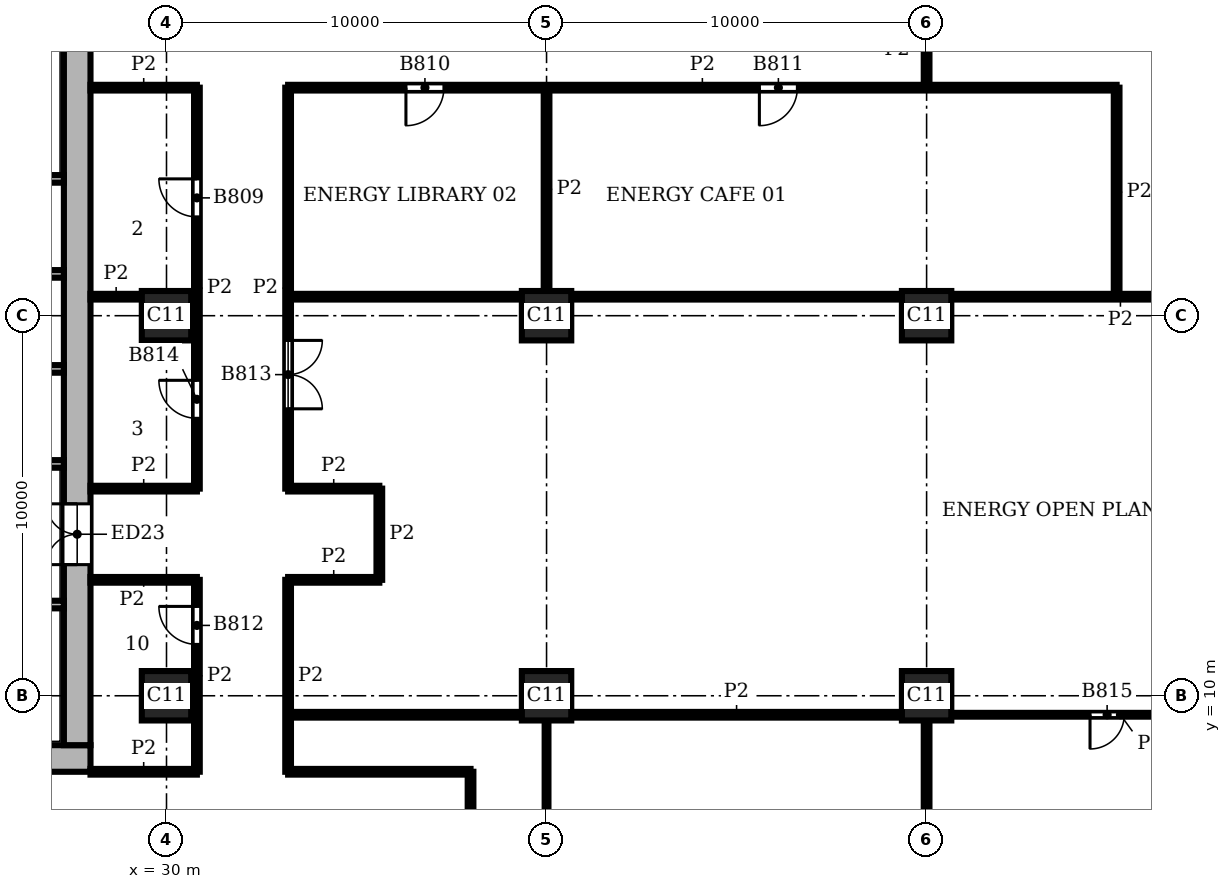
"""IFC4 building model, lengths in metres.
Left out: names, types, materials, properties, quantities, classifications, styles, units other than length and angle.
Written with IfcOpenShell. Run it as: python <this file> out.ifc"""

import sys

from ifc_helpers import new_model, si_unit, direction, frame, frame_2d, origin, origin_2d, place, context, subcontext, project, spatial, rectangle, extrude, element, fill, save


model = new_model("IFC4")
c1 = context("Model", 3, precision=1e-05, world=origin(), true_north=direction((0.0, 1.0)))
c2 = subcontext(c1, "Body", "Model", "MODEL_VIEW")
j1 = project(units=[si_unit("LENGTHUNIT", "METRE"), si_unit("PLANEANGLEUNIT", "RADIAN")], contexts=[c1])
p1 = place(None, origin())
s1 = spatial("IfcSite", under=j1, at=p1, CompositionType="ELEMENT")
p2 = place(p1, origin())
s2 = spatial("IfcBuilding", under=s1, at=p2, CompositionType="ELEMENT")
p3 = place(p2, frame((0.0, 0.0, 213.6)))
s3 = spatial("IfcBuildingStorey", under=s2, at=p3, CompositionType="ELEMENT", Elevation=213.6)
for number, where, z_axis, x_axis in (
    (1, (30.0, 10.0, 0.0), (0.0, 0.0, 1.0), (1.0, 0.0, 0.0)),
    (2, (30.0, 20.0, 0.0), (0.0, 0.0, 1.0), (1.0, 0.0, 0.0)),
    (3, (40.0, 10.0, 0.0), (0.0, 0.0, 1.0), (1.0, 0.0, 0.0)),
    (4, (40.0, 20.0, 0.0), (0.0, 0.0, 1.0), (1.0, 0.0, 0.0)),
    (5, (50.0, 10.0, 0.0), (0.0, 0.0, 1.0), (1.0, 0.0, 0.0)),
    (6, (50.0, 20.0, 0.0), (0.0, 0.0, 1.0), (1.0, 0.0, 0.0)),
):
    element("IfcColumn", number, at=place(p3, frame(where, z_axis=z_axis, x_axis=x_axis)), inside=s3, PredefinedType="COLUMN", context=c2, shape_type="SweptSolid", body=[
        extrude(rectangle(XDim=1.3, YDim=1.3, at=origin_2d()), origin(), (0.0, 0.0, 1.0), 3.9),
    ])
p4 = place(p3, frame((8.0, 8.35, 0.0), z_axis=(0.0, 0.0, 1.0), x_axis=(1.0, 0.0, 0.0)))
e7 = element("IfcWall", 7, at=p4, inside=s3, PredefinedType="SHEAR", context=c2, shape_type="SweptSolid", body=[
    extrude(rectangle(XDim=20.0, YDim=0.7, at=frame_2d((10.0, 0.0))), origin(), (0.0, 0.0, 1.0), 3.9),
])
p5 = place(p3, frame((27.65, 8.7, 0.0), z_axis=(0.0, 0.0, 1.0), x_axis=(0.0, 1.0, 0.0)))
e8 = element("IfcWall", 8, at=p5, inside=s3, PredefinedType="SHEAR", context=c2, shape_type="SweptSolid", body=[
    extrude(rectangle(XDim=18.6, YDim=0.7, at=frame_2d((9.3, 0.0))), origin(), (0.0, 0.0, 1.0), 3.9),
])
p6 = place(p5, frame((4.75, 0.0, 0.0)))
e9 = element("IfcOpeningElement", 9, at=p6, cuts=e8, PredefinedType="OPENING", context=c2, shape_type="SweptSolid", body=[
    extrude(rectangle(XDim=1.6, YDim=2.1, at=frame_2d((0.8, 1.05))), frame((0.0, 0.36, 0.0), z_axis=(0.0, -1.0, 0.0), x_axis=(1.0, 0.0, 0.0)), (0.0, 0.0, 1.0), 0.72),
])
p7 = place(p3, frame((13.8, 12.4, 0.0), z_axis=(0.0, 0.0, 1.0), x_axis=(1.0, 0.0, 0.0)))
e10 = element("IfcWall", 10, at=p7, inside=s3, PredefinedType="SHEAR", context=c2, shape_type="SweptSolid", body=[
    extrude(rectangle(XDim=13.5, YDim=0.2, at=frame_2d((6.75, 0.0))), origin(), (0.0, 0.0, 1.0), 3.58),
])
p8 = place(p7, frame((2.4, 0.0, 0.0)))
e11 = element("IfcOpeningElement", 11, at=p8, cuts=e10, PredefinedType="OPENING", context=c2, shape_type="SweptSolid", body=[
    extrude(rectangle(XDim=1.1, YDim=2.1, at=frame_2d((0.55, 1.05))), frame((0.0, 0.11, 0.0), z_axis=(0.0, -1.0, 0.0), x_axis=(1.0, 0.0, 0.0)), (0.0, 0.0, 1.0), 0.22),
])
p9 = place(p7, frame((4.9, 0.0, 0.0)))
e12 = element("IfcOpeningElement", 12, at=p9, cuts=e10, PredefinedType="OPENING", context=c2, shape_type="SweptSolid", body=[
    extrude(rectangle(XDim=1.1, YDim=2.1, at=frame_2d((0.55, 1.05))), frame((0.0, 0.11, 0.0), z_axis=(0.0, -1.0, 0.0), x_axis=(1.0, 0.0, 0.0)), (0.0, 0.0, 1.0), 0.22),
])
p10 = place(p7, frame((0.2, 0.0, 0.0)))
e13 = element("IfcOpeningElement", 13, at=p10, cuts=e10, PredefinedType="OPENING", context=c2, shape_type="SweptSolid", body=[
    extrude(rectangle(XDim=1.0, YDim=2.1, at=frame_2d((0.5, 1.05))), frame((0.0, 0.11, 0.0), z_axis=(0.0, -1.0, 0.0), x_axis=(1.0, 0.0, 0.0)), (0.0, 0.0, 1.0), 0.22),
])
for number, where, z_axis, x_axis in (
    (14, (24.3, 16.1, 0.0), (0.0, 0.0, 1.0), (1.0, 0.0, 0.0)),
    (15, (24.3, 18.6, 0.0), (0.0, 0.0, 1.0), (1.0, 0.0, 0.0)),
    (16, (24.3, 21.1, 0.0), (0.0, 0.0, 1.0), (1.0, 0.0, 0.0)),
):
    element("IfcWall", number, at=place(p3, frame(where, z_axis=z_axis, x_axis=x_axis)), inside=s3, PredefinedType="SHEAR", context=c2, shape_type="SweptSolid", body=[
        extrude(rectangle(XDim=3.0, YDim=0.2, at=frame_2d((1.5, 0.0))), origin(), (0.0, 0.0, 1.0), 3.58),
    ])
p11 = place(p3, frame((13.8, 23.6, 0.0), z_axis=(0.0, 0.0, 1.0), x_axis=(1.0, 0.0, 0.0)))
e17 = element("IfcWall", 17, at=p11, inside=s3, PredefinedType="SHEAR", context=c2, shape_type="SweptSolid", body=[
    extrude(rectangle(XDim=13.5, YDim=0.2, at=frame_2d((6.75, 0.0))), origin(), (0.0, 0.0, 1.0), 3.58),
])
p12 = place(p11, frame((2.4, 0.0, 0.0)))
e18 = element("IfcOpeningElement", 18, at=p12, cuts=e17, PredefinedType="OPENING", context=c2, shape_type="SweptSolid", body=[
    extrude(rectangle(XDim=1.1, YDim=2.1, at=frame_2d((0.55, 1.05))), frame((0.0, 0.11, 0.0), z_axis=(0.0, -1.0, 0.0), x_axis=(1.0, 0.0, 0.0)), (0.0, 0.0, 1.0), 0.22),
])
p13 = place(p11, frame((4.9, 0.0, 0.0)))
e19 = element("IfcOpeningElement", 19, at=p13, cuts=e17, PredefinedType="OPENING", context=c2, shape_type="SweptSolid", body=[
    extrude(rectangle(XDim=1.1, YDim=2.1, at=frame_2d((0.55, 1.05))), frame((0.0, 0.11, 0.0), z_axis=(0.0, -1.0, 0.0), x_axis=(1.0, 0.0, 0.0)), (0.0, 0.0, 1.0), 0.22),
])
p14 = place(p11, frame((0.2, 0.0, 0.0)))
e20 = element("IfcOpeningElement", 20, at=p14, cuts=e17, PredefinedType="OPENING", context=c2, shape_type="SweptSolid", body=[
    extrude(rectangle(XDim=1.0, YDim=2.1, at=frame_2d((0.5, 1.05))), frame((0.0, 0.11, 0.0), z_axis=(0.0, -1.0, 0.0), x_axis=(1.0, 0.0, 0.0)), (0.0, 0.0, 1.0), 0.22),
])
p15 = place(p3, frame((40.0, 0.45, 0.0), z_axis=(0.0, 0.0, 1.0), x_axis=(0.0, 1.0, 0.0)))
e21 = element("IfcWall", 21, at=p15, inside=s3, PredefinedType="PARTITIONING", context=c2, shape_type="SweptSolid", body=[
    extrude(rectangle(XDim=8.9, YDim=0.1, at=frame_2d((4.45, 0.0))), origin(), (0.0, 0.0, 1.0), 3.58),
])
p16 = place(p15, frame((3.975, 0.0, 0.0)))
e22 = element("IfcOpeningElement", 22, at=p16, cuts=e21, PredefinedType="OPENING", context=c2, shape_type="SweptSolid", body=[
    extrude(rectangle(XDim=0.95, YDim=2.1, at=frame_2d((0.475, 1.05))), frame((0.0, 0.06, 0.0), z_axis=(0.0, -1.0, 0.0), x_axis=(1.0, 0.0, 0.0)), (0.0, 0.0, 1.0), 0.12),
])
p17 = place(p3, frame((50.65, 9.5, 0.0), z_axis=(0.0, 0.0, 1.0), x_axis=(1.0, 0.0, 0.0)))
e23 = element("IfcWall", 23, at=p17, inside=s3, PredefinedType="PARTITIONING", context=c2, shape_type="SweptSolid", body=[
    extrude(rectangle(XDim=8.9, YDim=0.1, at=frame_2d((4.45, 0.0))), origin(), (0.0, 0.0, 1.0), 3.58),
])
p18 = place(p17, frame((3.65, 0.0, 0.0)))
e24 = element("IfcOpeningElement", 24, at=p18, cuts=e23, PredefinedType="OPENING", context=c2, shape_type="SweptSolid", body=[
    extrude(rectangle(XDim=0.9, YDim=2.1, at=frame_2d((0.45, 1.05))), frame((0.0, 0.06, 0.0), z_axis=(0.0, -1.0, 0.0), x_axis=(1.0, 0.0, 0.0)), (0.0, 0.0, 1.0), 0.12),
])
p19 = place(p3, frame((30.8, 8.001, 0.0), z_axis=(0.0, 0.0, 1.0), x_axis=(0.0, 1.0, 0.0)))
e25 = element("IfcWall", 25, at=p19, inside=s3, PredefinedType="PARTITIONING", context=c2, shape_type="SweptSolid", body=[
    extrude(rectangle(XDim=5.048, YDim=0.15, at=frame_2d((2.524, 0.0))), origin(), (0.0, 0.0, 1.0), 3.58),
])
p20 = place(p19, frame((3.35, 0.0, 0.0)))
e26 = element("IfcOpeningElement", 26, at=p20, cuts=e25, PredefinedType="OPENING", context=c2, shape_type="SweptSolid", body=[
    extrude(rectangle(XDim=1.0, YDim=2.1, at=frame_2d((0.5, 1.05))), frame((0.0, 0.085, 0.0), z_axis=(0.0, -1.0, 0.0), x_axis=(1.0, 0.0, 0.0)), (0.0, 0.0, 1.0), 0.17),
])
p21 = place(p3, frame((30.8, 15.45, 0.0), z_axis=(0.0, 0.0, 1.0), x_axis=(0.0, 1.0, 0.0)))
e27 = element("IfcWall", 27, at=p21, inside=s3, PredefinedType="PARTITIONING", context=c2, shape_type="SweptSolid", body=[
    extrude(rectangle(XDim=10.55, YDim=0.15, at=frame_2d((5.275, 0.0))), origin(), (0.0, 0.0, 1.0), 3.58),
])
p22 = place(p21, frame((7.15, 0.0, 0.0)))
e28 = element("IfcOpeningElement", 28, at=p22, cuts=e27, PredefinedType="OPENING", context=c2, shape_type="SweptSolid", body=[
    extrude(rectangle(XDim=1.0, YDim=2.1, at=frame_2d((0.5, 1.05))), frame((0.0, 0.085, 0.0), z_axis=(0.0, -1.0, 0.0), x_axis=(1.0, 0.0, 0.0)), (0.0, 0.0, 1.0), 0.17),
])
p23 = place(p21, frame((1.85, 0.0, 0.0)))
e29 = element("IfcOpeningElement", 29, at=p23, cuts=e27, PredefinedType="OPENING", context=c2, shape_type="SweptSolid", body=[
    extrude(rectangle(XDim=1.0, YDim=2.1, at=frame_2d((0.5, 1.05))), frame((0.0, 0.085, 0.0), z_axis=(0.0, -1.0, 0.0), x_axis=(1.0, 0.0, 0.0)), (0.0, 0.0, 1.0), 0.17),
])
p24 = place(p3, frame((33.2, 8.0, 0.0), z_axis=(0.0, 0.0, 1.0), x_axis=(0.0, 1.0, 0.0)))
e30 = element("IfcWall", 30, at=p24, inside=s3, PredefinedType="PARTITIONING", context=c2, shape_type="SweptSolid", body=[
    extrude(rectangle(XDim=5.05, YDim=0.15, at=frame_2d((2.525, 0.0))), origin(), (0.0, 0.0, 1.0), 3.58),
])
p25 = place(p3, frame((33.2, 15.45, 0.0), z_axis=(0.0, 0.0, 1.0), x_axis=(0.0, 1.0, 0.0)))
e31 = element("IfcWall", 31, at=p25, inside=s3, PredefinedType="PARTITIONING", context=c2, shape_type="SweptSolid", body=[
    extrude(rectangle(XDim=10.55, YDim=0.15, at=frame_2d((5.275, 0.0))), origin(), (0.0, 0.0, 1.0), 3.58),
])
p26 = place(p25, frame((2.1, 0.0, 0.0)))
e32 = element("IfcOpeningElement", 32, at=p26, cuts=e31, PredefinedType="OPENING", context=c2, shape_type="SweptSolid", body=[
    extrude(rectangle(XDim=1.8, YDim=2.1, at=frame_2d((0.9, 1.05))), frame((0.0, 0.085, 0.0), z_axis=(0.0, -1.0, 0.0), x_axis=(1.0, 0.0, 0.0)), (0.0, 0.0, 1.0), 0.17),
])
p27 = place(p3, frame((35.6, 13.05, 0.0), z_axis=(0.0, 0.0, 1.0), x_axis=(0.0, 1.0, 0.0)))
e33 = element("IfcWall", 33, at=p27, inside=s3, PredefinedType="PARTITIONING", context=c2, shape_type="SweptSolid", body=[
    extrude(rectangle(XDim=2.4, YDim=0.15, at=frame_2d((1.2, 0.0))), origin(), (0.0, 0.0, 1.0), 3.58),
])
p28 = place(p3, frame((38.0, 4.5, 0.0), z_axis=(0.0, 0.0, 1.0), x_axis=(0.0, 1.0, 0.0)))
e34 = element("IfcWall", 34, at=p28, inside=s3, PredefinedType="PARTITIONING", context=c2, shape_type="SweptSolid", body=[
    extrude(rectangle(XDim=3.5, YDim=0.15, at=frame_2d((1.75, 0.0))), origin(), (0.0, 0.0, 1.0), 3.58),
])
p29 = place(p3, frame((40.0, 20.65, 0.0), z_axis=(0.0, 0.0, 1.0), x_axis=(0.0, 1.0, 0.0)))
e35 = element("IfcWall", 35, at=p29, inside=s3, PredefinedType="PARTITIONING", context=c2, shape_type="SweptSolid", body=[
    extrude(rectangle(XDim=5.35, YDim=0.15, at=frame_2d((2.675, 0.0))), origin(), (0.0, 0.0, 1.0), 3.58),
])
p30 = place(p3, frame((50.0, 0.45, 0.0), z_axis=(0.0, 0.0, 1.0), x_axis=(0.0, 1.0, 0.0)))
e36 = element("IfcWall", 36, at=p30, inside=s3, PredefinedType="PARTITIONING", context=c2, shape_type="SweptSolid", body=[
    extrude(rectangle(XDim=8.9, YDim=0.15, at=frame_2d((4.45, 0.0))), origin(), (0.0, 0.0, 1.0), 3.58),
])
p31 = place(p3, frame((50.0, 26.0, 0.0), z_axis=(0.0, 0.0, 1.0), x_axis=(0.0, 1.0, 0.0)))
e37 = element("IfcWall", 37, at=p31, inside=s3, PredefinedType="PARTITIONING", context=c2, shape_type="SweptSolid", body=[
    extrude(rectangle(XDim=3.55, YDim=0.15, at=frame_2d((1.775, 0.0))), origin(), (0.0, 0.0, 1.0), 3.58),
])
p32 = place(p31, frame((1.35, 0.0, 0.0)))
e38 = element("IfcOpeningElement", 38, at=p32, cuts=e37, PredefinedType="OPENING", context=c2, shape_type="SweptSolid", body=[
    extrude(rectangle(XDim=1.0, YDim=2.1, at=frame_2d((0.5, 1.05))), frame((0.0, 0.085, 0.0), z_axis=(0.0, -1.0, 0.0), x_axis=(1.0, 0.0, 0.0)), (0.0, 0.0, 1.0), 0.17),
])
p33 = place(p3, frame((55.0, 20.5, 0.0), z_axis=(0.0, 0.0, 1.0), x_axis=(0.0, 1.0, 0.0)))
e39 = element("IfcWall", 39, at=p33, inside=s3, PredefinedType="PARTITIONING", context=c2, shape_type="SweptSolid", body=[
    extrude(rectangle(XDim=5.5, YDim=0.15, at=frame_2d((2.75, 0.0))), origin(), (0.0, 0.0, 1.0), 3.58),
])
p34 = place(p3, frame((28.0, 8.0, 0.0), z_axis=(0.0, 0.0, 1.0), x_axis=(1.0, 0.0, 0.0)))
e40 = element("IfcWall", 40, at=p34, inside=s3, PredefinedType="PARTITIONING", context=c2, shape_type="SweptSolid", body=[
    extrude(rectangle(XDim=2.799, YDim=0.15, at=frame_2d((1.399, 0.0))), origin(), (0.0, 0.0, 1.0), 3.58),
])
p35 = place(p3, frame((33.2, 8.0, 0.0), z_axis=(0.0, 0.0, 1.0), x_axis=(1.0, 0.0, 0.0)))
e41 = element("IfcWall", 41, at=p35, inside=s3, PredefinedType="PARTITIONING", context=c2, shape_type="SweptSolid", body=[
    extrude(rectangle(XDim=4.8, YDim=0.15, at=frame_2d((2.4, 0.0))), origin(), (0.0, 0.0, 1.0), 3.58),
])
p36 = place(p3, frame((33.2, 9.5, 0.0), z_axis=(0.0, 0.0, 1.0), x_axis=(1.0, 0.0, 0.0)))
e42 = element("IfcWall", 42, at=p36, inside=s3, PredefinedType="PARTITIONING", context=c2, shape_type="SweptSolid", body=[
    extrude(rectangle(XDim=6.15, YDim=0.15, at=frame_2d((3.075, 0.0))), origin(), (0.0, 0.0, 1.0), 3.58),
])
p37 = place(p3, frame((40.65, 9.5, 0.0), z_axis=(0.0, 0.0, 1.0), x_axis=(1.0, 0.0, 0.0)))
e43 = element("IfcWall", 43, at=p37, inside=s3, PredefinedType="PARTITIONING", context=c2, shape_type="SweptSolid", body=[
    extrude(rectangle(XDim=8.7, YDim=0.15, at=frame_2d((4.35, 0.0))), origin(), (0.0, 0.0, 1.0), 3.58),
])
p38 = place(p3, frame((28.0, 13.05, 0.0), z_axis=(0.0, 0.0, 1.0), x_axis=(1.0, 0.0, 0.0)))
e44 = element("IfcWall", 44, at=p38, inside=s3, PredefinedType="PARTITIONING", context=c2, shape_type="SweptSolid", body=[
    extrude(rectangle(XDim=2.799, YDim=0.15, at=frame_2d((1.399, 0.0))), origin(), (0.0, 0.0, 1.0), 3.58),
])
p39 = place(p3, frame((33.2, 13.05, 0.0), z_axis=(0.0, 0.0, 1.0), x_axis=(1.0, 0.0, 0.0)))
e45 = element("IfcWall", 45, at=p39, inside=s3, PredefinedType="PARTITIONING", context=c2, shape_type="SweptSolid", body=[
    extrude(rectangle(XDim=2.4, YDim=0.15, at=frame_2d((1.2, 0.0))), origin(), (0.0, 0.0, 1.0), 3.58),
])
p40 = place(p3, frame((28.0, 15.45, 0.0), z_axis=(0.0, 0.0, 1.0), x_axis=(1.0, 0.0, 0.0)))
e46 = element("IfcWall", 46, at=p40, inside=s3, PredefinedType="PARTITIONING", context=c2, shape_type="SweptSolid", body=[
    extrude(rectangle(XDim=2.8, YDim=0.15, at=frame_2d((1.4, 0.0))), origin(), (0.0, 0.0, 1.0), 3.58),
])
p41 = place(p3, frame((33.2, 15.45, 0.0), z_axis=(0.0, 0.0, 1.0), x_axis=(1.0, 0.0, 0.0)))
e47 = element("IfcWall", 47, at=p41, inside=s3, PredefinedType="PARTITIONING", context=c2, shape_type="SweptSolid", body=[
    extrude(rectangle(XDim=2.4, YDim=0.15, at=frame_2d((1.2, 0.0))), origin(), (0.0, 0.0, 1.0), 3.58),
])
p42 = place(p3, frame((28.0, 20.5, 0.0), z_axis=(0.0, 0.0, 1.0), x_axis=(1.0, 0.0, 0.0)))
e48 = element("IfcWall", 48, at=p42, inside=s3, PredefinedType="PARTITIONING", context=c2, shape_type="SweptSolid", body=[
    extrude(rectangle(XDim=1.35, YDim=0.15, at=frame_2d((0.675, 0.0))), origin(), (0.0, 0.0, 1.0), 3.58),
])
p43 = place(p3, frame((33.2, 20.5, 0.0), z_axis=(0.0, 0.0, 1.0), x_axis=(1.0, 0.0, 0.0)))
e49 = element("IfcWall", 49, at=p43, inside=s3, PredefinedType="PARTITIONING", context=c2, shape_type="SweptSolid", body=[
    extrude(rectangle(XDim=6.15, YDim=0.15, at=frame_2d((3.075, 0.0))), origin(), (0.0, 0.0, 1.0), 3.58),
])
p44 = place(p3, frame((40.65, 20.5, 0.0), z_axis=(0.0, 0.0, 1.0), x_axis=(1.0, 0.0, 0.0)))
e50 = element("IfcWall", 50, at=p44, inside=s3, PredefinedType="PARTITIONING", context=c2, shape_type="SweptSolid", body=[
    extrude(rectangle(XDim=8.7, YDim=0.15, at=frame_2d((4.35, 0.0))), origin(), (0.0, 0.0, 1.0), 3.58),
])
p45 = place(p3, frame((50.65, 20.5, 0.0), z_axis=(0.0, 0.0, 1.0), x_axis=(1.0, 0.0, 0.0)))
e51 = element("IfcWall", 51, at=p45, inside=s3, PredefinedType="PARTITIONING", context=c2, shape_type="SweptSolid", body=[
    extrude(rectangle(XDim=8.9, YDim=0.15, at=frame_2d((4.45, 0.0))), origin(), (0.0, 0.0, 1.0), 3.58),
])
p46 = place(p3, frame((28.0, 26.0, 0.0), z_axis=(0.0, 0.0, 1.0), x_axis=(1.0, 0.0, 0.0)))
e52 = element("IfcWall", 52, at=p46, inside=s3, PredefinedType="PARTITIONING", context=c2, shape_type="SweptSolid", body=[
    extrude(rectangle(XDim=2.8, YDim=0.15, at=frame_2d((1.4, 0.0))), origin(), (0.0, 0.0, 1.0), 3.58),
])
p47 = place(p3, frame((33.2, 26.0, 0.0), z_axis=(0.0, 0.0, 1.0), x_axis=(1.0, 0.0, 0.0)))
e53 = element("IfcWall", 53, at=p47, inside=s3, PredefinedType="PARTITIONING", context=c2, shape_type="SweptSolid", body=[
    extrude(rectangle(XDim=21.8, YDim=0.15, at=frame_2d((10.9, 0.0))), origin(), (0.0, 0.0, 1.0), 3.58),
])
p48 = place(p47, frame((3.1, 0.0, 0.0)))
e54 = element("IfcOpeningElement", 54, at=p48, cuts=e53, PredefinedType="OPENING", context=c2, shape_type="SweptSolid", body=[
    extrude(rectangle(XDim=1.0, YDim=2.1, at=frame_2d((0.5, 1.05))), frame((0.0, 0.085, 0.0), z_axis=(0.0, -1.0, 0.0), x_axis=(1.0, 0.0, 0.0)), (0.0, 0.0, 1.0), 0.17),
])
p49 = place(p47, frame((12.4, 0.0, 0.0)))
e55 = element("IfcOpeningElement", 55, at=p49, cuts=e53, PredefinedType="OPENING", context=c2, shape_type="SweptSolid", body=[
    extrude(rectangle(XDim=1.0, YDim=2.1, at=frame_2d((0.5, 1.05))), frame((0.0, 0.085, 0.0), z_axis=(0.0, -1.0, 0.0), x_axis=(1.0, 0.0, 0.0)), (0.0, 0.0, 1.0), 0.17),
])
p50 = place(p6, origin())
e56 = element("IfcDoor", 56, at=p50, inside=s3, OperationType="DOUBLE_DOOR_SINGLE_SWING", PredefinedType="DOOR", context=c2, shape_type="SweptSolid", body=[
    extrude(rectangle(XDim=1.6, YDim=2.1, at=frame_2d((0.8, 1.05))), frame((0.0, 0.025, 0.0), z_axis=(0.0, -1.0, 0.0), x_axis=(1.0, 0.0, 0.0)), (0.0, 0.0, 1.0), 0.05),
])
fill(e9, e56)
p51 = place(p22, origin())
e57 = element("IfcDoor", 57, at=p51, inside=s3, OperationType="SINGLE_SWING_RIGHT", PredefinedType="DOOR", context=c2, shape_type="SweptSolid", body=[
    extrude(rectangle(XDim=1.0, YDim=2.1, at=frame_2d((0.5, 1.05))), frame((0.0, 0.025, 0.0), z_axis=(0.0, -1.0, 0.0), x_axis=(1.0, 0.0, 0.0)), (0.0, 0.0, 1.0), 0.05),
])
fill(e28, e57)
p52 = place(p48, frame((1.0, 0.0, 0.0), z_axis=(0.0, 0.0, 1.0), x_axis=(-1.0, 0.0, 0.0)))
e58 = element("IfcDoor", 58, at=p52, inside=s3, OperationType="SINGLE_SWING_RIGHT", PredefinedType="DOOR", context=c2, shape_type="SweptSolid", body=[
    extrude(rectangle(XDim=1.0, YDim=2.1, at=frame_2d((0.5, 1.05))), frame((0.0, 0.025, 0.0), z_axis=(0.0, -1.0, 0.0), x_axis=(1.0, 0.0, 0.0)), (0.0, 0.0, 1.0), 0.05),
])
fill(e54, e58)
p53 = place(p49, frame((1.0, 0.0, 0.0), z_axis=(0.0, 0.0, 1.0), x_axis=(-1.0, 0.0, 0.0)))
e59 = element("IfcDoor", 59, at=p53, inside=s3, OperationType="SINGLE_SWING_RIGHT", PredefinedType="DOOR", context=c2, shape_type="SweptSolid", body=[
    extrude(rectangle(XDim=1.0, YDim=2.1, at=frame_2d((0.5, 1.05))), frame((0.0, 0.025, 0.0), z_axis=(0.0, -1.0, 0.0), x_axis=(1.0, 0.0, 0.0)), (0.0, 0.0, 1.0), 0.05),
])
fill(e55, e59)
p54 = place(p20, origin())
e60 = element("IfcDoor", 60, at=p54, inside=s3, OperationType="SINGLE_SWING_RIGHT", PredefinedType="DOOR", context=c2, shape_type="SweptSolid", body=[
    extrude(rectangle(XDim=1.0, YDim=2.1, at=frame_2d((0.5, 1.05))), frame((0.0, 0.025, 0.0), z_axis=(0.0, -1.0, 0.0), x_axis=(1.0, 0.0, 0.0)), (0.0, 0.0, 1.0), 0.05),
])
fill(e26, e60)
p55 = place(p26, frame((1.8, 0.0, 0.0), z_axis=(0.0, 0.0, 1.0), x_axis=(-1.0, 0.0, 0.0)))
e61 = element("IfcDoor", 61, at=p55, inside=s3, OperationType="DOUBLE_DOOR_SINGLE_SWING", PredefinedType="DOOR", context=c2, shape_type="SweptSolid", body=[
    extrude(rectangle(XDim=1.8, YDim=2.1, at=frame_2d((0.9, 1.05))), frame((0.0, 0.025, 0.0), z_axis=(0.0, -1.0, 0.0), x_axis=(1.0, 0.0, 0.0)), (0.0, 0.0, 1.0), 0.05),
])
fill(e32, e61)
p56 = place(p23, origin())
e62 = element("IfcDoor", 62, at=p56, inside=s3, OperationType="SINGLE_SWING_RIGHT", PredefinedType="DOOR", context=c2, shape_type="SweptSolid", body=[
    extrude(rectangle(XDim=1.0, YDim=2.1, at=frame_2d((0.5, 1.05))), frame((0.0, 0.025, 0.0), z_axis=(0.0, -1.0, 0.0), x_axis=(1.0, 0.0, 0.0)), (0.0, 0.0, 1.0), 0.05),
])
fill(e29, e62)
p57 = place(p18, frame((0.9, 0.0, 0.0), z_axis=(0.0, 0.0, 1.0), x_axis=(-1.0, 0.0, 0.0)))
e63 = element("IfcDoor", 63, at=p57, inside=s3, OperationType="SINGLE_SWING_RIGHT", PredefinedType="DOOR", context=c2, shape_type="SweptSolid", body=[
    extrude(rectangle(XDim=0.9, YDim=2.1, at=frame_2d((0.45, 1.05))), frame((0.0, 0.025, 0.0), z_axis=(0.0, -1.0, 0.0), x_axis=(1.0, 0.0, 0.0)), (0.0, 0.0, 1.0), 0.05),
])
fill(e24, e63)
save(model, sys.argv[1])
